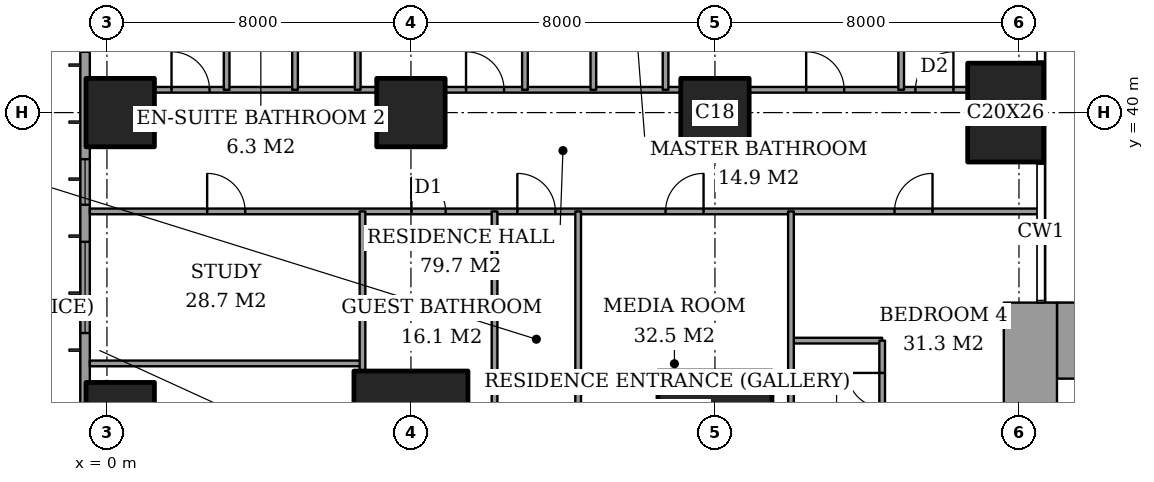
"""IFC4 building model, lengths in metres.
Left out: names, types, materials, properties, quantities, classifications, styles, units other than length and angle.
Written with IfcOpenShell. Run it as: python <this file> out.ifc"""

import sys

from ifc_helpers import new_model, si_unit, direction, frame, frame_2d, origin, origin_2d, place, context, subcontext, project, spatial, rectangle, extrude, element, fill, save


model = new_model("IFC4")
c1 = context("Model", 3, precision=1e-05, world=origin(), true_north=direction((0.0, 1.0)))
c2 = subcontext(c1, "Body", "Model", "MODEL_VIEW")
j1 = project(units=[si_unit("LENGTHUNIT", "METRE"), si_unit("PLANEANGLEUNIT", "RADIAN")], contexts=[c1])
p1 = place(None, origin())
s1 = spatial("IfcSite", under=j1, at=p1, CompositionType="ELEMENT")
p2 = place(p1, origin())
s2 = spatial("IfcBuilding", under=s1, at=p2, CompositionType="ELEMENT")
p3 = place(p2, frame((0.0, 0.0, 214.6)))
s3 = spatial("IfcBuildingStorey", under=s2, at=p3, CompositionType="ELEMENT", Elevation=214.6)
for number, where, z_axis, x_axis in (
    (1, (0.35, 32.0, 0.0), (0.0, 0.0, 1.0), (1.0, 0.0, 0.0)),
    (2, (0.35, 40.0, 0.0), (0.0, 0.0, 1.0), (1.0, 0.0, 0.0)),
):
    element("IfcColumn", number, at=place(p3, frame(where, z_axis=z_axis, x_axis=x_axis)), inside=s3, PredefinedType="COLUMN", context=c2, shape_type="SweptSolid", body=[
        extrude(rectangle(XDim=1.8, YDim=1.8, at=origin_2d()), origin(), (0.0, 0.0, 1.0), 3.6),
    ])
p4 = place(p3, frame((8.0, 32.0, 0.0), z_axis=(0.0, 0.0, 1.0), x_axis=(1.0, 0.0, 0.0)))
e3 = element("IfcColumn", 3, at=p4, inside=s3, PredefinedType="COLUMN", context=c2, shape_type="SweptSolid", body=[
    extrude(rectangle(XDim=3.0, YDim=2.4, at=origin_2d()), origin(), (0.0, 0.0, 1.0), 3.6),
])
p5 = place(p3, frame((8.0, 40.0, 0.0), z_axis=(0.0, 0.0, 1.0), x_axis=(1.0, 0.0, 0.0)))
e4 = element("IfcColumn", 4, at=p5, inside=s3, PredefinedType="COLUMN", context=c2, shape_type="SweptSolid", body=[
    extrude(rectangle(XDim=1.8, YDim=1.8, at=origin_2d()), origin(), (0.0, 0.0, 1.0), 3.6),
])
p6 = place(p3, frame((16.0, 32.0, 0.0), z_axis=(0.0, 0.0, 1.0), x_axis=(1.0, 0.0, 0.0)))
e5 = element("IfcColumn", 5, at=p6, inside=s3, PredefinedType="COLUMN", context=c2, shape_type="SweptSolid", body=[
    extrude(rectangle(XDim=3.0, YDim=2.4, at=origin_2d()), origin(), (0.0, 0.0, 1.0), 3.6),
])
p7 = place(p3, frame((16.0, 40.0, 0.0), z_axis=(0.0, 0.0, 1.0), x_axis=(1.0, 0.0, 0.0)))
e6 = element("IfcColumn", 6, at=p7, inside=s3, PredefinedType="COLUMN", context=c2, shape_type="SweptSolid", body=[
    extrude(rectangle(XDim=1.8, YDim=1.8, at=origin_2d()), origin(), (0.0, 0.0, 1.0), 3.6),
])
p8 = place(p3, frame((23.65, 40.0, 0.0), z_axis=(0.0, 0.0, 1.0), x_axis=(1.0, 0.0, 0.0)))
e7 = element("IfcColumn", 7, at=p8, inside=s3, PredefinedType="COLUMN", context=c2, shape_type="SweptSolid", body=[
    extrude(rectangle(XDim=2.0, YDim=2.6, at=origin_2d()), origin(), (0.0, 0.0, 1.0), 3.6),
])
p9 = place(p3, frame((25.0, 34.0, 0.0), z_axis=(0.0, 0.0, 1.0), x_axis=(1.0, 0.0, 0.0)))
e8 = element("IfcWall", 8, at=p9, inside=s3, PredefinedType="SHEAR", context=c2, shape_type="SweptSolid", body=[
    extrude(rectangle(XDim=3.15, YDim=2.0, at=frame_2d((1.575, 0.0))), origin(), (0.0, 0.0, 1.0), 3.6),
])
p10 = place(p3, frame((24.3, 23.15, 0.0), z_axis=(0.0, 0.0, 1.0), x_axis=(0.0, 1.0, 0.0)))
e9 = element("IfcWall", 9, at=p10, inside=s3, PredefinedType="SHEAR", context=c2, shape_type="SweptSolid", body=[
    extrude(rectangle(XDim=11.85, YDim=1.4, at=frame_2d((5.925, 0.0))), origin(), (0.0, 0.0, 1.0), 3.6),
])
p11 = place(p10, frame((0.75, 0.0, 0.0)))
e10 = element("IfcOpeningElement", 10, at=p11, cuts=e9, PredefinedType="OPENING", context=c2, shape_type="SweptSolid", body=[
    extrude(rectangle(XDim=1.8, YDim=2.4, at=frame_2d((0.9, 1.2))), frame((0.0, 0.71, 0.0), z_axis=(0.0, -1.0, 0.0), x_axis=(1.0, 0.0, 0.0)), (0.0, 0.0, 1.0), 1.42),
])
p12 = place(p3, frame((-0.575, 44.825, 0.0), z_axis=(0.0, 0.0, 1.0), x_axis=(0.0, -1.0, 0.0)))
e11 = element("IfcWall", 11, at=p12, inside=s3, PredefinedType="SOLIDWALL", context=c2, shape_type="SweptSolid", body=[
    extrude(rectangle(XDim=41.65, YDim=0.25, at=frame_2d((20.825, 0.0))), origin(), (0.0, 0.0, 1.0), 3.6),
])
p13 = place(p12, frame((0.825, 0.0, 0.2)))
e12 = element("IfcOpeningElement", 12, at=p13, cuts=e11, PredefinedType="OPENING", context=c2, shape_type="SweptSolid", body=[
    extrude(rectangle(XDim=2.4, YDim=2.4, at=frame_2d((1.2, 1.2))), frame((0.0, 0.135, 0.0), z_axis=(0.0, -1.0, 0.0), x_axis=(1.0, 0.0, 0.0)), (0.0, 0.0, 1.0), 0.27),
])
p14 = place(p12, frame((6.05, 0.0, 0.2)))
e13 = element("IfcOpeningElement", 13, at=p14, cuts=e11, PredefinedType="OPENING", context=c2, shape_type="SweptSolid", body=[
    extrude(rectangle(XDim=1.2, YDim=2.4, at=frame_2d((0.6, 1.2))), frame((0.0, 0.135, 0.0), z_axis=(0.0, -1.0, 0.0), x_axis=(1.0, 0.0, 0.0)), (0.0, 0.0, 1.0), 0.27),
])
p15 = place(p12, frame((8.225, 0.0, 0.2)))
e14 = element("IfcOpeningElement", 14, at=p15, cuts=e11, PredefinedType="OPENING", context=c2, shape_type="SweptSolid", body=[
    extrude(rectangle(XDim=2.4, YDim=2.4, at=frame_2d((1.2, 1.2))), frame((0.0, 0.135, 0.0), z_axis=(0.0, -1.0, 0.0), x_axis=(1.0, 0.0, 0.0)), (0.0, 0.0, 1.0), 0.27),
])
p16 = place(p12, frame((15.625, 0.0, 0.2)))
e15 = element("IfcOpeningElement", 15, at=p16, cuts=e11, PredefinedType="OPENING", context=c2, shape_type="SweptSolid", body=[
    extrude(rectangle(XDim=2.4, YDim=2.4, at=frame_2d((1.2, 1.2))), frame((0.0, 0.135, 0.0), z_axis=(0.0, -1.0, 0.0), x_axis=(1.0, 0.0, 0.0)), (0.0, 0.0, 1.0), 0.27),
])
p17 = place(p12, frame((23.625, 0.0, 0.2)))
e16 = element("IfcOpeningElement", 16, at=p17, cuts=e11, PredefinedType="OPENING", context=c2, shape_type="SweptSolid", body=[
    extrude(rectangle(XDim=2.4, YDim=2.4, at=frame_2d((1.2, 1.2))), frame((0.0, 0.135, 0.0), z_axis=(0.0, -1.0, 0.0), x_axis=(1.0, 0.0, 0.0)), (0.0, 0.0, 1.0), 0.27),
])
p18 = place(p12, frame((30.775, 0.0, 0.2)))
e17 = element("IfcOpeningElement", 17, at=p18, cuts=e11, PredefinedType="OPENING", context=c2, shape_type="SweptSolid", body=[
    extrude(rectangle(XDim=2.4, YDim=2.4, at=frame_2d((1.2, 1.2))), frame((0.0, 0.135, 0.0), z_axis=(0.0, -1.0, 0.0), x_axis=(1.0, 0.0, 0.0)), (0.0, 0.0, 1.0), 0.27),
])
p19 = place(p12, frame((34.55, 0.0, 0.2)))
e18 = element("IfcOpeningElement", 18, at=p19, cuts=e11, PredefinedType="OPENING", context=c2, shape_type="SweptSolid", body=[
    extrude(rectangle(XDim=1.2, YDim=2.4, at=frame_2d((0.6, 1.2))), frame((0.0, 0.135, 0.0), z_axis=(0.0, -1.0, 0.0), x_axis=(1.0, 0.0, 0.0)), (0.0, 0.0, 1.0), 0.27),
])
p20 = place(p12, frame((38.425, 0.0, 0.2)))
e19 = element("IfcOpeningElement", 19, at=p20, cuts=e11, PredefinedType="OPENING", context=c2, shape_type="SweptSolid", body=[
    extrude(rectangle(XDim=2.4, YDim=2.4, at=frame_2d((1.2, 1.2))), frame((0.0, 0.135, 0.0), z_axis=(0.0, -1.0, 0.0), x_axis=(1.0, 0.0, 0.0)), (0.0, 0.0, 1.0), 0.27),
])
p21 = place(p3, frame((-0.45, 33.4, 0.0), z_axis=(0.0, 0.0, 1.0), x_axis=(1.0, 0.0, 0.0)))
e20 = element("IfcWall", 20, at=p21, inside=s3, PredefinedType="PARTITIONING", context=c2, shape_type="SweptSolid", body=[
    extrude(rectangle(XDim=7.175, YDim=0.15, at=frame_2d((3.587, 0.0))), origin(), (0.0, 0.0, 1.0), 3.35),
])
p22 = place(p3, frame((18.0, 34.0, 0.0), z_axis=(0.0, 0.0, 1.0), x_axis=(1.0, 0.0, 0.0)))
e21 = element("IfcWall", 21, at=p22, inside=s3, PredefinedType="PARTITIONING", context=c2, shape_type="SweptSolid", body=[
    extrude(rectangle(XDim=2.4, YDim=0.15, at=frame_2d((1.2, 0.0))), origin(), (0.0, 0.0, 1.0), 3.35),
])
p23 = place(p3, frame((-0.45, 37.4, 0.0), z_axis=(0.0, 0.0, 1.0), x_axis=(1.0, 0.0, 0.0)))
e22 = element("IfcWall", 22, at=p23, inside=s3, PredefinedType="PARTITIONING", context=c2, shape_type="SweptSolid", body=[
    extrude(rectangle(XDim=25.011, YDim=0.15, at=frame_2d((12.505, 0.0))), origin(), (0.0, 0.0, 1.0), 3.35),
])
p24 = place(p23, frame((11.25, 0.0, 0.0)))
e23 = element("IfcOpeningElement", 23, at=p24, cuts=e22, PredefinedType="OPENING", context=c2, shape_type="SweptSolid", body=[
    extrude(rectangle(XDim=1.0, YDim=2.1, at=frame_2d((0.5, 1.05))), frame((0.0, 0.085, 0.0), z_axis=(0.0, -1.0, 0.0), x_axis=(1.0, 0.0, 0.0)), (0.0, 0.0, 1.0), 0.17),
])
p25 = place(p23, frame((3.087, 0.0, 0.0)))
e24 = element("IfcOpeningElement", 24, at=p25, cuts=e22, PredefinedType="OPENING", context=c2, shape_type="SweptSolid", body=[
    extrude(rectangle(XDim=1.0, YDim=2.1, at=frame_2d((0.5, 1.05))), frame((0.0, 0.085, 0.0), z_axis=(0.0, -1.0, 0.0), x_axis=(1.0, 0.0, 0.0)), (0.0, 0.0, 1.0), 0.17),
])
p26 = place(p23, frame((8.462, 0.0, 0.0)))
e25 = element("IfcOpeningElement", 25, at=p26, cuts=e22, PredefinedType="OPENING", context=c2, shape_type="SweptSolid", body=[
    extrude(rectangle(XDim=0.9, YDim=2.1, at=frame_2d((0.45, 1.05))), frame((0.0, 0.085, 0.0), z_axis=(0.0, -1.0, 0.0), x_axis=(1.0, 0.0, 0.0)), (0.0, 0.0, 1.0), 0.17),
])
p27 = place(p23, frame((15.15, 0.0, 0.0)))
e26 = element("IfcOpeningElement", 26, at=p27, cuts=e22, PredefinedType="OPENING", context=c2, shape_type="SweptSolid", body=[
    extrude(rectangle(XDim=1.0, YDim=2.1, at=frame_2d((0.5, 1.05))), frame((0.0, 0.085, 0.0), z_axis=(0.0, -1.0, 0.0), x_axis=(1.0, 0.0, 0.0)), (0.0, 0.0, 1.0), 0.17),
])
p28 = place(p23, frame((21.175, 0.0, 0.0)))
e27 = element("IfcOpeningElement", 27, at=p28, cuts=e22, PredefinedType="OPENING", context=c2, shape_type="SweptSolid", body=[
    extrude(rectangle(XDim=1.0, YDim=2.1, at=frame_2d((0.5, 1.05))), frame((0.0, 0.085, 0.0), z_axis=(0.0, -1.0, 0.0), x_axis=(1.0, 0.0, 0.0)), (0.0, 0.0, 1.0), 0.17),
])
p29 = place(p3, frame((1.25, 40.6, 0.0), z_axis=(0.0, 0.0, 1.0), x_axis=(1.0, 0.0, 0.0)))
e28 = element("IfcWall", 28, at=p29, inside=s3, PredefinedType="PARTITIONING", context=c2, shape_type="SweptSolid", body=[
    extrude(rectangle(XDim=5.85, YDim=0.15, at=frame_2d((2.925, 0.0))), origin(), (0.0, 0.0, 1.0), 3.35),
])
p30 = place(p29, frame((0.45, 0.0, 0.0)))
e29 = element("IfcOpeningElement", 29, at=p30, cuts=e28, PredefinedType="OPENING", context=c2, shape_type="SweptSolid", body=[
    extrude(rectangle(XDim=1.0, YDim=2.1, at=frame_2d((0.5, 1.05))), frame((0.0, 0.085, 0.0), z_axis=(0.0, -1.0, 0.0), x_axis=(1.0, 0.0, 0.0)), (0.0, 0.0, 1.0), 0.17),
])
p31 = place(p3, frame((8.9, 40.6, 0.0), z_axis=(0.0, 0.0, 1.0), x_axis=(1.0, 0.0, 0.0)))
e30 = element("IfcWall", 30, at=p31, inside=s3, PredefinedType="PARTITIONING", context=c2, shape_type="SweptSolid", body=[
    extrude(rectangle(XDim=6.2, YDim=0.15, at=frame_2d((3.1, 0.0))), origin(), (0.0, 0.0, 1.0), 3.35),
])
p32 = place(p31, frame((0.55, 0.0, 0.0)))
e31 = element("IfcOpeningElement", 31, at=p32, cuts=e30, PredefinedType="OPENING", context=c2, shape_type="SweptSolid", body=[
    extrude(rectangle(XDim=1.0, YDim=2.1, at=frame_2d((0.5, 1.05))), frame((0.0, 0.085, 0.0), z_axis=(0.0, -1.0, 0.0), x_axis=(1.0, 0.0, 0.0)), (0.0, 0.0, 1.0), 0.17),
])
p33 = place(p3, frame((16.9, 40.6, 0.0), z_axis=(0.0, 0.0, 1.0), x_axis=(1.0, 0.0, 0.0)))
e32 = element("IfcWall", 32, at=p33, inside=s3, PredefinedType="PARTITIONING", context=c2, shape_type="SweptSolid", body=[
    extrude(rectangle(XDim=5.75, YDim=0.15, at=frame_2d((2.875, 0.0))), origin(), (0.0, 0.0, 1.0), 3.35),
])
p34 = place(p33, frame((1.5, 0.0, 0.0)))
e33 = element("IfcOpeningElement", 33, at=p34, cuts=e32, PredefinedType="OPENING", context=c2, shape_type="SweptSolid", body=[
    extrude(rectangle(XDim=1.0, YDim=2.1, at=frame_2d((0.5, 1.05))), frame((0.0, 0.085, 0.0), z_axis=(0.0, -1.0, 0.0), x_axis=(1.0, 0.0, 0.0)), (0.0, 0.0, 1.0), 0.17),
])
p35 = place(p33, frame((4.375, 0.0, 0.0)))
e34 = element("IfcOpeningElement", 34, at=p35, cuts=e32, PredefinedType="OPENING", context=c2, shape_type="SweptSolid", body=[
    extrude(rectangle(XDim=1.0, YDim=2.1, at=frame_2d((0.5, 1.05))), frame((0.0, 0.085, 0.0), z_axis=(0.0, -1.0, 0.0), x_axis=(1.0, 0.0, 0.0)), (0.0, 0.0, 1.0), 0.17),
])
p36 = place(p3, frame((3.15, 40.6, 0.0), z_axis=(0.0, 0.0, 1.0), x_axis=(0.0, 1.0, 0.0)))
e35 = element("IfcWall", 35, at=p36, inside=s3, PredefinedType="PARTITIONING", context=c2, shape_type="SweptSolid", body=[
    extrude(rectangle(XDim=3.5, YDim=0.15, at=frame_2d((1.75, 0.0))), origin(), (0.0, 0.0, 1.0), 3.35),
])
p37 = place(p36, frame((1.3, 0.0, 0.0)))
e36 = element("IfcOpeningElement", 36, at=p37, cuts=e35, PredefinedType="OPENING", context=c2, shape_type="SweptSolid", body=[
    extrude(rectangle(XDim=0.9, YDim=2.1, at=frame_2d((0.45, 1.05))), frame((0.0, 0.085, 0.0), z_axis=(0.0, -1.0, 0.0), x_axis=(1.0, 0.0, 0.0)), (0.0, 0.0, 1.0), 0.17),
])
p38 = place(p3, frame((4.95, 40.6, 0.0), z_axis=(0.0, 0.0, 1.0), x_axis=(0.0, 1.0, 0.0)))
e37 = element("IfcWall", 37, at=p38, inside=s3, PredefinedType="PARTITIONING", context=c2, shape_type="SweptSolid", body=[
    extrude(rectangle(XDim=7.85, YDim=0.15, at=frame_2d((3.925, 0.0))), origin(), (0.0, 0.0, 1.0), 3.35),
])
p39 = place(p38, frame((5.225, 0.0, 0.0)))
e38 = element("IfcOpeningElement", 38, at=p39, cuts=e37, PredefinedType="OPENING", context=c2, shape_type="SweptSolid", body=[
    extrude(rectangle(XDim=0.9, YDim=2.1, at=frame_2d((0.45, 1.05))), frame((0.0, 0.085, 0.0), z_axis=(0.0, -1.0, 0.0), x_axis=(1.0, 0.0, 0.0)), (0.0, 0.0, 1.0), 0.17),
])
p40 = place(p3, frame((6.6, 40.6, 0.0), z_axis=(0.0, 0.0, 1.0), x_axis=(0.0, 1.0, 0.0)))
e39 = element("IfcWall", 39, at=p40, inside=s3, PredefinedType="PARTITIONING", context=c2, shape_type="SweptSolid", body=[
    extrude(rectangle(XDim=7.85, YDim=0.15, at=frame_2d((3.925, 0.0))), origin(), (0.0, 0.0, 1.0), 3.35),
])
p41 = place(p3, frame((6.725, 33.2, 0.0), z_axis=(0.0, 0.0, 1.0), x_axis=(0.0, 1.0, 0.0)))
e40 = element("IfcWall", 40, at=p41, inside=s3, PredefinedType="PARTITIONING", context=c2, shape_type="SweptSolid", body=[
    extrude(rectangle(XDim=4.2, YDim=0.15, at=frame_2d((2.1, 0.0))), origin(), (0.0, 0.0, 1.0), 3.35),
])
p42 = place(p3, frame((10.2, 28.0, 0.0), z_axis=(0.0, 0.0, 1.0), x_axis=(0.0, 1.0, 0.0)))
e41 = element("IfcWall", 41, at=p42, inside=s3, PredefinedType="PARTITIONING", context=c2, shape_type="SweptSolid", body=[
    extrude(rectangle(XDim=9.4, YDim=0.15, at=frame_2d((4.7, 0.0))), origin(), (0.0, 0.0, 1.0), 3.35),
])
p43 = place(p42, frame((0.837, 0.0, 0.0)))
e42 = element("IfcOpeningElement", 42, at=p43, cuts=e41, PredefinedType="OPENING", context=c2, shape_type="SweptSolid", body=[
    extrude(rectangle(XDim=1.0, YDim=2.1, at=frame_2d((0.5, 1.05))), frame((0.0, 0.085, 0.0), z_axis=(0.0, -1.0, 0.0), x_axis=(1.0, 0.0, 0.0)), (0.0, 0.0, 1.0), 0.17),
])
p44 = place(p3, frame((11.0, 40.6, 0.0), z_axis=(0.0, 0.0, 1.0), x_axis=(0.0, 1.0, 0.0)))
e43 = element("IfcWall", 43, at=p44, inside=s3, PredefinedType="PARTITIONING", context=c2, shape_type="SweptSolid", body=[
    extrude(rectangle(XDim=7.85, YDim=0.15, at=frame_2d((3.925, 0.0))), origin(), (0.0, 0.0, 1.0), 3.35),
])
p45 = place(p44, frame((3.475, 0.0, 0.0)))
e44 = element("IfcOpeningElement", 44, at=p45, cuts=e43, PredefinedType="OPENING", context=c2, shape_type="SweptSolid", body=[
    extrude(rectangle(XDim=0.9, YDim=2.1, at=frame_2d((0.45, 1.05))), frame((0.0, 0.085, 0.0), z_axis=(0.0, -1.0, 0.0), x_axis=(1.0, 0.0, 0.0)), (0.0, 0.0, 1.0), 0.17),
])
p46 = place(p3, frame((12.4, 30.675, 0.0), z_axis=(0.0, 0.0, 1.0), x_axis=(0.0, 1.0, 0.0)))
e45 = element("IfcWall", 45, at=p46, inside=s3, PredefinedType="PARTITIONING", context=c2, shape_type="SweptSolid", body=[
    extrude(rectangle(XDim=6.725, YDim=0.15, at=frame_2d((3.362, 0.0))), origin(), (0.0, 0.0, 1.0), 3.35),
])
p47 = place(p3, frame((12.8, 40.6, 0.0), z_axis=(0.0, 0.0, 1.0), x_axis=(0.0, 1.0, 0.0)))
e46 = element("IfcWall", 46, at=p47, inside=s3, PredefinedType="PARTITIONING", context=c2, shape_type="SweptSolid", body=[
    extrude(rectangle(XDim=7.85, YDim=0.15, at=frame_2d((3.925, 0.0))), origin(), (0.0, 0.0, 1.0), 3.35),
])
p48 = place(p3, frame((14.7, 40.6, 0.0), z_axis=(0.0, 0.0, 1.0), x_axis=(0.0, 1.0, 0.0)))
e47 = element("IfcWall", 47, at=p48, inside=s3, PredefinedType="PARTITIONING", context=c2, shape_type="SweptSolid", body=[
    extrude(rectangle(XDim=7.85, YDim=0.15, at=frame_2d((3.925, 0.0))), origin(), (0.0, 0.0, 1.0), 3.35),
])
p49 = place(p48, frame((3.475, 0.0, 0.0)))
e48 = element("IfcOpeningElement", 48, at=p49, cuts=e47, PredefinedType="OPENING", context=c2, shape_type="SweptSolid", body=[
    extrude(rectangle(XDim=0.9, YDim=2.1, at=frame_2d((0.45, 1.05))), frame((0.0, 0.085, 0.0), z_axis=(0.0, -1.0, 0.0), x_axis=(1.0, 0.0, 0.0)), (0.0, 0.0, 1.0), 0.17),
])
p50 = place(p3, frame((18.0, 28.0, 0.0), z_axis=(0.0, 0.0, 1.0), x_axis=(0.0, 1.0, 0.0)))
e49 = element("IfcWall", 49, at=p50, inside=s3, PredefinedType="PARTITIONING", context=c2, shape_type="SweptSolid", body=[
    extrude(rectangle(XDim=9.4, YDim=0.15, at=frame_2d((4.7, 0.0))), origin(), (0.0, 0.0, 1.0), 3.35),
])
p51 = place(p50, frame((0.837, 0.0, 0.0)))
e50 = element("IfcOpeningElement", 50, at=p51, cuts=e49, PredefinedType="OPENING", context=c2, shape_type="SweptSolid", body=[
    extrude(rectangle(XDim=1.0, YDim=2.1, at=frame_2d((0.5, 1.05))), frame((0.0, 0.085, 0.0), z_axis=(0.0, -1.0, 0.0), x_axis=(1.0, 0.0, 0.0)), (0.0, 0.0, 1.0), 0.17),
])
p52 = place(p3, frame((20.4, 31.4, 0.0), z_axis=(0.0, 0.0, 1.0), x_axis=(0.0, 1.0, 0.0)))
e51 = element("IfcWall", 51, at=p52, inside=s3, PredefinedType="PARTITIONING", context=c2, shape_type="SweptSolid", body=[
    extrude(rectangle(XDim=2.6, YDim=0.15, at=frame_2d((1.3, 0.0))), origin(), (0.0, 0.0, 1.0), 3.35),
])
p53 = place(p52, frame((0.85, 0.0, 0.0)))
e52 = element("IfcOpeningElement", 52, at=p53, cuts=e51, PredefinedType="OPENING", context=c2, shape_type="SweptSolid", body=[
    extrude(rectangle(XDim=0.9, YDim=2.1, at=frame_2d((0.45, 1.05))), frame((0.0, 0.085, 0.0), z_axis=(0.0, -1.0, 0.0), x_axis=(1.0, 0.0, 0.0)), (0.0, 0.0, 1.0), 0.17),
])
p54 = place(p3, frame((20.9, 40.6, 0.0), z_axis=(0.0, 0.0, 1.0), x_axis=(0.0, 1.0, 0.0)))
e53 = element("IfcWall", 53, at=p54, inside=s3, PredefinedType="PARTITIONING", context=c2, shape_type="SweptSolid", body=[
    extrude(rectangle(XDim=7.85, YDim=0.15, at=frame_2d((3.925, 0.0))), origin(), (0.0, 0.0, 1.0), 3.35),
])
p55 = place(p14, origin())
e54 = element("IfcWindow", 54, at=p55, inside=s3, PartitioningType="SINGLE_PANEL", PredefinedType="WINDOW", context=c2, shape_type="SweptSolid", body=[
    extrude(rectangle(XDim=1.2, YDim=2.4, at=frame_2d((0.6, 1.2))), frame((0.0, 0.03, 0.0), z_axis=(0.0, -1.0, 0.0), x_axis=(1.0, 0.0, 0.0)), (0.0, 0.0, 1.0), 0.06),
])
fill(e13, e54)
p56 = place(p15, origin())
e55 = element("IfcWindow", 55, at=p56, inside=s3, PartitioningType="SINGLE_PANEL", PredefinedType="WINDOW", context=c2, shape_type="SweptSolid", body=[
    extrude(rectangle(XDim=2.4, YDim=2.4, at=frame_2d((1.2, 1.2))), frame((0.0, 0.03, 0.0), z_axis=(0.0, -1.0, 0.0), x_axis=(1.0, 0.0, 0.0)), (0.0, 0.0, 1.0), 0.06),
])
fill(e14, e55)
p57 = place(p30, origin())
e56 = element("IfcDoor", 56, at=p57, inside=s3, OperationType="SINGLE_SWING_RIGHT", PredefinedType="DOOR", context=c2, shape_type="SweptSolid", body=[
    extrude(rectangle(XDim=1.0, YDim=2.1, at=frame_2d((0.5, 1.05))), frame((0.0, 0.025, 0.0), z_axis=(0.0, -1.0, 0.0), x_axis=(1.0, 0.0, 0.0)), (0.0, 0.0, 1.0), 0.05),
])
fill(e29, e56)
p58 = place(p32, origin())
e57 = element("IfcDoor", 57, at=p58, inside=s3, OperationType="SINGLE_SWING_RIGHT", PredefinedType="DOOR", context=c2, shape_type="SweptSolid", body=[
    extrude(rectangle(XDim=1.0, YDim=2.1, at=frame_2d((0.5, 1.05))), frame((0.0, 0.025, 0.0), z_axis=(0.0, -1.0, 0.0), x_axis=(1.0, 0.0, 0.0)), (0.0, 0.0, 1.0), 0.05),
])
fill(e31, e57)
p59 = place(p34, origin())
e58 = element("IfcDoor", 58, at=p59, inside=s3, OperationType="SINGLE_SWING_RIGHT", PredefinedType="DOOR", context=c2, shape_type="SweptSolid", body=[
    extrude(rectangle(XDim=1.0, YDim=2.1, at=frame_2d((0.5, 1.05))), frame((0.0, 0.025, 0.0), z_axis=(0.0, -1.0, 0.0), x_axis=(1.0, 0.0, 0.0)), (0.0, 0.0, 1.0), 0.05),
])
fill(e33, e58)
p60 = place(p35, origin())
e59 = element("IfcDoor", 59, at=p60, inside=s3, OperationType="SINGLE_SWING_LEFT", PredefinedType="DOOR", context=c2, shape_type="SweptSolid", body=[
    extrude(rectangle(XDim=1.0, YDim=2.1, at=frame_2d((0.5, 1.05))), frame((0.0, 0.025, 0.0), z_axis=(0.0, -1.0, 0.0), x_axis=(1.0, 0.0, 0.0)), (0.0, 0.0, 1.0), 0.05),
])
fill(e34, e59)
p61 = place(p24, origin())
e60 = element("IfcDoor", 60, at=p61, inside=s3, OperationType="SINGLE_SWING_RIGHT", PredefinedType="DOOR", context=c2, shape_type="SweptSolid", body=[
    extrude(rectangle(XDim=1.0, YDim=2.1, at=frame_2d((0.5, 1.05))), frame((0.0, 0.025, 0.0), z_axis=(0.0, -1.0, 0.0), x_axis=(1.0, 0.0, 0.0)), (0.0, 0.0, 1.0), 0.05),
])
fill(e23, e60)
p62 = place(p25, origin())
e61 = element("IfcDoor", 61, at=p62, inside=s3, OperationType="SINGLE_SWING_RIGHT", PredefinedType="DOOR", context=c2, shape_type="SweptSolid", body=[
    extrude(rectangle(XDim=1.0, YDim=2.1, at=frame_2d((0.5, 1.05))), frame((0.0, 0.025, 0.0), z_axis=(0.0, -1.0, 0.0), x_axis=(1.0, 0.0, 0.0)), (0.0, 0.0, 1.0), 0.05),
])
fill(e24, e61)
p63 = place(p26, origin())
e62 = element("IfcDoor", 62, at=p63, inside=s3, OperationType="SINGLE_SWING_RIGHT", PredefinedType="DOOR", context=c2, shape_type="SweptSolid", body=[
    extrude(rectangle(XDim=0.9, YDim=2.1, at=frame_2d((0.45, 1.05))), frame((0.0, 0.025, 0.0), z_axis=(0.0, -1.0, 0.0), x_axis=(1.0, 0.0, 0.0)), (0.0, 0.0, 1.0), 0.05),
])
fill(e25, e62)
p64 = place(p27, origin())
e63 = element("IfcDoor", 63, at=p64, inside=s3, OperationType="SINGLE_SWING_LEFT", PredefinedType="DOOR", context=c2, shape_type="SweptSolid", body=[
    extrude(rectangle(XDim=1.0, YDim=2.1, at=frame_2d((0.5, 1.05))), frame((0.0, 0.025, 0.0), z_axis=(0.0, -1.0, 0.0), x_axis=(1.0, 0.0, 0.0)), (0.0, 0.0, 1.0), 0.05),
])
fill(e26, e63)
p65 = place(p53, origin())
e64 = element("IfcDoor", 64, at=p65, inside=s3, OperationType="SINGLE_SWING_LEFT", PredefinedType="DOOR", context=c2, shape_type="SweptSolid", body=[
    extrude(rectangle(XDim=0.9, YDim=2.1, at=frame_2d((0.45, 1.05))), frame((0.0, 0.025, 0.0), z_axis=(0.0, -1.0, 0.0), x_axis=(1.0, 0.0, 0.0)), (0.0, 0.0, 1.0), 0.05),
])
fill(e52, e64)
p66 = place(p28, origin())
e65 = element("IfcDoor", 65, at=p66, inside=s3, OperationType="SINGLE_SWING_LEFT", PredefinedType="DOOR", context=c2, shape_type="SweptSolid", body=[
    extrude(rectangle(XDim=1.0, YDim=2.1, at=frame_2d((0.5, 1.05))), frame((0.0, 0.025, 0.0), z_axis=(0.0, -1.0, 0.0), x_axis=(1.0, 0.0, 0.0)), (0.0, 0.0, 1.0), 0.05),
])
fill(e27, e65)
save(model, sys.argv[1])
